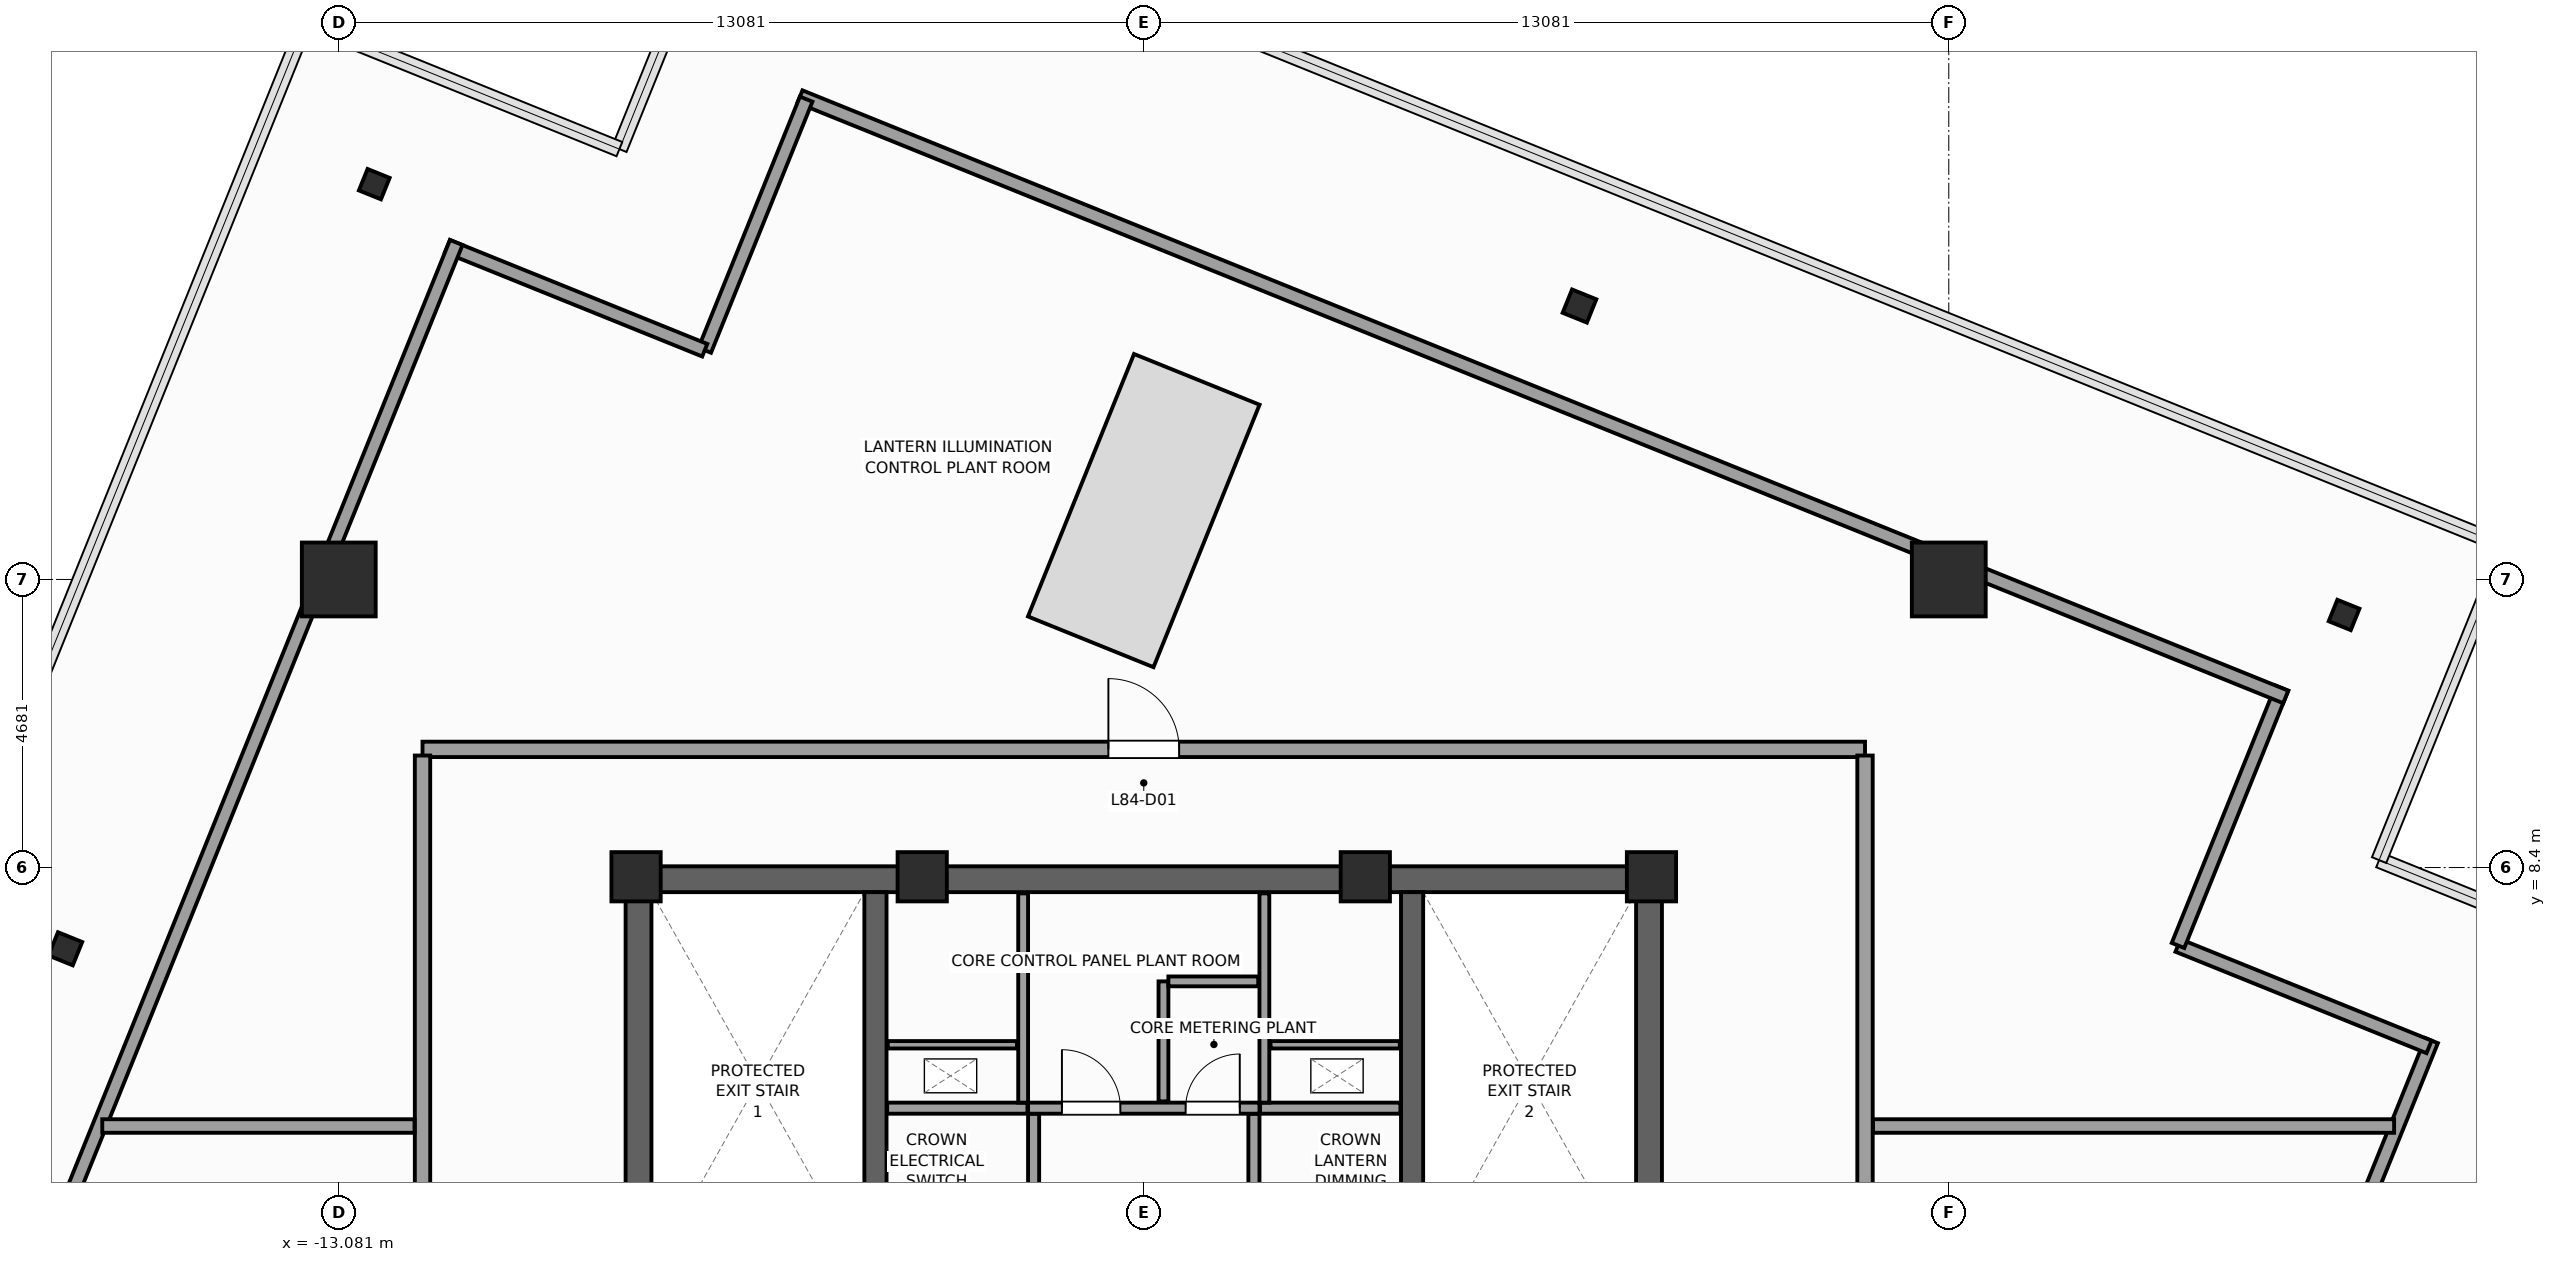
"""IFC4 building model, lengths in metres.
Left out: names, types, materials, properties, quantities, classifications, styles, units other than length and angle.
Written with IfcOpenShell. Run it as: python <this file> out.ifc"""

import sys

from ifc_helpers import new_model, si_unit, direction, frame, frame_2d, origin, origin_2d, place, context, subcontext, project, spatial, rectangle, i_section, extrude, source, transform, mapped, element, fill, save


model = new_model("IFC4")
c1 = context("Model", 3, precision=1e-05, world=origin(), true_north=direction((0.0, 1.0)))
c2 = subcontext(c1, "Body", "Model", "MODEL_VIEW")
j1 = project(units=[si_unit("LENGTHUNIT", "METRE"), si_unit("PLANEANGLEUNIT", "RADIAN")], contexts=[c1])
p1 = place(None, origin())
s1 = spatial("IfcSite", under=j1, at=p1, CompositionType="ELEMENT")
p2 = place(p1, origin())
s2 = spatial("IfcBuilding", under=s1, at=p2, CompositionType="ELEMENT")
p3 = place(p2, frame((0.0, 0.0, 341.6)))
s3 = spatial("IfcBuildingStorey", under=s2, at=p3, CompositionType="ELEMENT", Elevation=341.6)
p4 = place(p3, frame((-8.42, 8.21, 0.0), z_axis=(0.0, 0.0, 1.0), x_axis=(1.0, 0.0, 0.0)))
e1 = element("IfcWall", 1, at=p4, inside=s3, PredefinedType="SHEAR", context=c2, shape_type="SweptSolid", body=[
    extrude(rectangle(XDim=16.84, YDim=0.42, at=frame_2d((8.42, 0.0))), origin(), (0.0, 0.0, 1.0), 4.0),
])
p5 = place(p3, frame((-8.21, -8.0, 0.0), z_axis=(0.0, 0.0, 1.0), x_axis=(0.0, 1.0, 0.0)))
e2 = element("IfcWall", 2, at=p5, inside=s3, PredefinedType="SHEAR", context=c2, shape_type="SweptSolid", body=[
    extrude(rectangle(XDim=16.0, YDim=0.42, at=frame_2d((8.0, 0.0))), origin(), (0.0, 0.0, 1.0), 4.0),
])
p6 = place(p5, frame((4.69, 0.0, 0.0)))
e3 = element("IfcOpeningElement", 3, at=p6, cuts=e2, PredefinedType="OPENING", context=c2, shape_type="SweptSolid", body=[
    extrude(rectangle(XDim=1.3, YDim=2.2, at=frame_2d((0.65, 1.1))), frame((0.0, 0.22, 0.0), z_axis=(0.0, -1.0, 0.0), x_axis=(1.0, 0.0, 0.0)), (0.0, 0.0, 1.0), 0.44),
])
p7 = place(p3, frame((8.21, -8.0, 0.0), z_axis=(0.0, 0.0, 1.0), x_axis=(0.0, 1.0, 0.0)))
e4 = element("IfcWall", 4, at=p7, inside=s3, PredefinedType="SHEAR", context=c2, shape_type="SweptSolid", body=[
    extrude(rectangle(XDim=16.0, YDim=0.42, at=frame_2d((8.0, 0.0))), origin(), (0.0, 0.0, 1.0), 4.0),
])
p8 = place(p7, frame((4.69, 0.0, 0.0)))
e5 = element("IfcOpeningElement", 5, at=p8, cuts=e4, PredefinedType="OPENING", context=c2, shape_type="SweptSolid", body=[
    extrude(rectangle(XDim=1.3, YDim=2.2, at=frame_2d((0.65, 1.1))), frame((0.0, 0.22, 0.0), z_axis=(0.0, -1.0, 0.0), x_axis=(1.0, 0.0, 0.0)), (0.0, 0.0, 1.0), 0.44),
])
for number, where, z_axis, x_axis in (
    (6, (-4.36, -8.0, 0.0), (0.0, 0.0, 1.0), (0.0, 1.0, 0.0)),
    (7, (4.36, -8.0, 0.0), (0.0, 0.0, 1.0), (0.0, 1.0, 0.0)),
):
    element("IfcWall", number, at=place(p3, frame(where, z_axis=z_axis, x_axis=x_axis)), inside=s3, PredefinedType="SHEAR", context=c2, shape_type="SweptSolid", body=[
        extrude(rectangle(XDim=16.0, YDim=0.36, at=frame_2d((8.0, 0.0))), origin(), (0.0, 0.0, 1.0), 4.0),
    ])
m1 = source(origin(), c2, "Body", "SweptSolid", [
    extrude(rectangle(XDim=0.8, YDim=0.8, at=origin_2d()), origin(), (0.0, 0.0, 1.0), 4.0),
])
for number, where, z_axis, x_axis in (
    (8, (8.25, 8.25, 0.0), (0.0, 0.0, 1.0), (1.0, 0.0, 0.0)),
    (9, (-8.25, 8.25, 0.0), (0.0, 0.0, 1.0), (1.0, 0.0, 0.0)),
    (10, (-3.6, 8.25, 0.0), (0.0, 0.0, 1.0), (1.0, 0.0, 0.0)),
    (11, (3.6, 8.25, 0.0), (0.0, 0.0, 1.0), (1.0, 0.0, 0.0)),
):
    element("IfcColumn", number, at=place(p3, frame(where, z_axis=z_axis, x_axis=x_axis)), inside=s3, PredefinedType="PILASTER", context=c2, shape_type="MappedRepresentation", body=[
        mapped(m1, transform((0.0, 0.0, 0.0), scale=1.0)),
    ])
m2 = source(origin(), c2, "Body", "SweptSolid", [
    extrude(rectangle(XDim=1.2, YDim=1.2, at=origin_2d()), origin(), (0.0, 0.0, 1.0), 4.0),
])
for number, where, z_axis, x_axis in (
    (12, (13.081, 13.081, 0.0), (0.0, 0.0, 1.0), (1.0, 0.0, 0.0)),
    (13, (-13.081, 13.081, 0.0), (0.0, 0.0, 1.0), (1.0, 0.0, 0.0)),
):
    element("IfcColumn", number, at=place(p3, frame(where, z_axis=z_axis, x_axis=x_axis)), inside=s3, PredefinedType="COLUMN", context=c2, shape_type="MappedRepresentation", body=[
        mapped(m2, transform((0.0, 0.0, 0.0), scale=1.0)),
    ])
m3 = source(origin(), c2, "Body", "SweptSolid", [
    extrude(i_section(OverallWidth=0.376, OverallDepth=0.387, WebThickness=0.02, FlangeThickness=0.032, FilletRadius=0.015, at=origin_2d()), origin(), (0.0, 0.0, 1.0), 4.0),
])
p9 = place(p3, frame((19.504, 12.504, 0.0), z_axis=(0.0, 0.0, 1.0), x_axis=(0.374606593416, 0.927183854567, 0.0)))
e14 = element("IfcColumn", 14, at=p9, inside=s3, PredefinedType="COLUMN", context=c2, shape_type="MappedRepresentation", body=[
    mapped(m3, transform((0.0, 0.0, 0.0), scale=1.0)),
])
m4 = source(origin(), c2, "Body", "SweptSolid", [
    extrude(i_section(OverallWidth=0.409, OverallDepth=0.425, WebThickness=0.024, FlangeThickness=0.039, FilletRadius=0.015, at=origin_2d()), origin(), (0.0, 0.0, 1.0), 4.0),
])
p10 = place(p3, frame((7.08, 17.524, 0.0), z_axis=(0.0, 0.0, 1.0), x_axis=(0.374606593416, 0.927183854567, 0.0)))
e15 = element("IfcColumn", 15, at=p10, inside=s3, PredefinedType="COLUMN", context=c2, shape_type="MappedRepresentation", body=[
    mapped(m4, transform((0.0, 0.0, 0.0), scale=1.0)),
])
p11 = place(p3, frame((-12.504, 19.504, 0.0), z_axis=(0.0, 0.0, 1.0), x_axis=(0.374606593416, 0.927183854567, 0.0)))
e16 = element("IfcColumn", 16, at=p11, inside=s3, PredefinedType="COLUMN", context=c2, shape_type="MappedRepresentation", body=[
    mapped(m3, transform((0.0, 0.0, 0.0), scale=1.0)),
])
p12 = place(p3, frame((-17.524, 7.08, 0.0), z_axis=(0.0, 0.0, 1.0), x_axis=(0.374606593416, 0.927183854567, 0.0)))
e17 = element("IfcColumn", 17, at=p12, inside=s3, PredefinedType="COLUMN", context=c2, shape_type="MappedRepresentation", body=[
    mapped(m4, transform((0.0, 0.0, 0.0), scale=1.0)),
])
p13 = place(p3, frame((-1.79, -7.98, 0.0), z_axis=(0.0, 0.0, 1.0), x_axis=(0.0, 1.0, 0.0)))
e18 = element("IfcWall", 18, at=p13, inside=s3, PredefinedType="PARTITIONING", context=c2, shape_type="SweptSolid", body=[
    extrude(rectangle(XDim=12.38, YDim=0.18, at=frame_2d((6.19, 0.0))), origin(), (0.0, 0.0, 1.0), 3.65),
])
p14 = place(p13, frame((3.5, 0.0, 0.0)))
e19 = element("IfcOpeningElement", 19, at=p14, cuts=e18, PredefinedType="OPENING", context=c2, shape_type="SweptSolid", body=[
    extrude(rectangle(XDim=1.15, YDim=2.25, at=frame_2d((0.575, 1.125))), frame((0.0, 0.1, 0.0), z_axis=(0.0, -1.0, 0.0), x_axis=(1.0, 0.0, 0.0)), (0.0, 0.0, 1.0), 0.2),
])
p15 = place(p13, frame((9.8, 0.0, 0.0)))
e20 = element("IfcOpeningElement", 20, at=p15, cuts=e18, PredefinedType="OPENING", context=c2, shape_type="SweptSolid", body=[
    extrude(rectangle(XDim=1.15, YDim=2.25, at=frame_2d((0.575, 1.125))), frame((0.0, 0.1, 0.0), z_axis=(0.0, -1.0, 0.0), x_axis=(1.0, 0.0, 0.0)), (0.0, 0.0, 1.0), 0.2),
])
p16 = place(p3, frame((1.79, -7.98, 0.0), z_axis=(0.0, 0.0, 1.0), x_axis=(0.0, 1.0, 0.0)))
e21 = element("IfcWall", 21, at=p16, inside=s3, PredefinedType="PARTITIONING", context=c2, shape_type="SweptSolid", body=[
    extrude(rectangle(XDim=12.38, YDim=0.18, at=frame_2d((6.19, 0.0))), origin(), (0.0, 0.0, 1.0), 3.65),
])
p17 = place(p16, frame((3.5, 0.0, 0.0)))
e22 = element("IfcOpeningElement", 22, at=p17, cuts=e21, PredefinedType="OPENING", context=c2, shape_type="SweptSolid", body=[
    extrude(rectangle(XDim=1.15, YDim=2.25, at=frame_2d((0.575, 1.125))), frame((0.0, 0.1, 0.0), z_axis=(0.0, -1.0, 0.0), x_axis=(1.0, 0.0, 0.0)), (0.0, 0.0, 1.0), 0.2),
])
p18 = place(p16, frame((9.8, 0.0, 0.0)))
e23 = element("IfcOpeningElement", 23, at=p18, cuts=e21, PredefinedType="OPENING", context=c2, shape_type="SweptSolid", body=[
    extrude(rectangle(XDim=1.15, YDim=2.25, at=frame_2d((0.575, 1.125))), frame((0.0, 0.1, 0.0), z_axis=(0.0, -1.0, 0.0), x_axis=(1.0, 0.0, 0.0)), (0.0, 0.0, 1.0), 0.2),
])
p19 = place(p3, frame((-1.88, 4.49, 0.0), z_axis=(0.0, 0.0, 1.0), x_axis=(1.0, 0.0, 0.0)))
e24 = element("IfcWall", 24, at=p19, inside=s3, PredefinedType="PARTITIONING", context=c2, shape_type="SweptSolid", body=[
    extrude(rectangle(XDim=3.76, YDim=0.18, at=frame_2d((1.88, 0.0))), origin(), (0.0, 0.0, 1.0), 3.65),
])
p20 = place(p19, frame((0.55, 0.0, 0.0)))
e25 = element("IfcOpeningElement", 25, at=p20, cuts=e24, PredefinedType="OPENING", context=c2, shape_type="SweptSolid", body=[
    extrude(rectangle(XDim=0.95, YDim=2.1, at=frame_2d((0.475, 1.05))), frame((0.0, 0.1, 0.0), z_axis=(0.0, -1.0, 0.0), x_axis=(1.0, 0.0, 0.0)), (0.0, 0.0, 1.0), 0.2),
])
p21 = place(p19, frame((2.56, 0.0, 0.0)))
e26 = element("IfcOpeningElement", 26, at=p21, cuts=e24, PredefinedType="OPENING", context=c2, shape_type="SweptSolid", body=[
    extrude(rectangle(XDim=0.88, YDim=2.1, at=frame_2d((0.44, 1.05))), frame((0.0, 0.1, 0.0), z_axis=(0.0, -1.0, 0.0), x_axis=(1.0, 0.0, 0.0)), (0.0, 0.0, 1.0), 0.2),
])
for number, where, z_axis, x_axis in (
    (27, (-4.17, 4.49, 0.0), (0.0, 0.0, 1.0), (1.0, 0.0, 0.0)),
    (28, (1.89, 4.49, 0.0), (0.0, 0.0, 1.0), (1.0, 0.0, 0.0)),
):
    element("IfcWall", number, at=place(p3, frame(where, z_axis=z_axis, x_axis=x_axis)), inside=s3, PredefinedType="PARTITIONING", context=c2, shape_type="SweptSolid", body=[
        extrude(rectangle(XDim=2.28, YDim=0.18, at=frame_2d((1.14, 0.0))), origin(), (0.0, 0.0, 1.0), 3.65),
    ])
for number, where, z_axis, x_axis in (
    (29, (-1.96, 4.58, 0.0), (0.0, 0.0, 1.0), (0.0, 1.0, 0.0)),
    (30, (1.96, 4.58, 0.0), (0.0, 0.0, 1.0), (0.0, 1.0, 0.0)),
):
    element("IfcWall", number, at=place(p3, frame(where, z_axis=z_axis, x_axis=x_axis)), inside=s3, PredefinedType="PARTITIONING", context=c2, shape_type="SweptSolid", body=[
        extrude(rectangle(XDim=3.4, YDim=0.16, at=frame_2d((1.7, 0.0))), origin(), (0.0, 0.0, 1.0), 3.65),
    ])
for number, where, z_axis, x_axis in (
    (31, (-4.16, 5.52, 0.0), (0.0, 0.0, 1.0), (1.0, 0.0, 0.0)),
    (32, (2.06, 5.52, 0.0), (0.0, 0.0, 1.0), (1.0, 0.0, 0.0)),
):
    element("IfcWall", number, at=place(p3, frame(where, z_axis=z_axis, x_axis=x_axis)), inside=s3, PredefinedType="PARTITIONING", context=c2, shape_type="SweptSolid", body=[
        extrude(rectangle(XDim=2.1, YDim=0.12, at=frame_2d((1.05, 0.0))), origin(), (0.0, 0.0, 1.0), 3.65),
    ])
p22 = place(p3, frame((0.32, 4.6, 0.0), z_axis=(0.0, 0.0, 1.0), x_axis=(0.0, 1.0, 0.0)))
e33 = element("IfcWall", 33, at=p22, inside=s3, PredefinedType="PARTITIONING", context=c2, shape_type="SweptSolid", body=[
    extrude(rectangle(XDim=1.95, YDim=0.16, at=frame_2d((0.975, 0.0))), origin(), (0.0, 0.0, 1.0), 3.65),
])
p23 = place(p3, frame((0.4, 6.55, 0.0), z_axis=(0.0, 0.0, 1.0), x_axis=(1.0, 0.0, 0.0)))
e34 = element("IfcWall", 34, at=p23, inside=s3, PredefinedType="PARTITIONING", context=c2, shape_type="SweptSolid", body=[
    extrude(rectangle(XDim=1.46, YDim=0.16, at=frame_2d((0.73, 0.0))), origin(), (0.0, 0.0, 1.0), 3.65),
])
p24 = place(p3, frame((11.172, -18.556, 0.0), z_axis=(0.0, 0.0, 1.0), x_axis=(0.374611707018, 0.927181788521, 0.0)))
e35 = element("IfcWall", 35, at=p24, inside=s3, PredefinedType="PARTITIONING", context=c2, shape_type="SweptSolid", body=[
    extrude(rectangle(XDim=26.04, YDim=0.22, at=frame_2d((13.02, 0.0))), origin(), (0.0, 0.0, 1.0), 3.0),
])
p25 = place(p3, frame((20.886, 5.486, 0.0), z_axis=(0.0, 0.0, 1.0), x_axis=(-0.927189216671, 0.374593321469, 0.0)))
e36 = element("IfcWall", 36, at=p25, inside=s3, PredefinedType="PARTITIONING", context=c2, shape_type="SweptSolid", body=[
    extrude(rectangle(XDim=4.4, YDim=0.22, at=frame_2d((2.2, 0.0))), origin(), (0.0, 0.0, 1.0), 3.65),
])
p26 = place(p3, frame((16.806, 7.134, 0.0), z_axis=(0.0, 0.0, 1.0), x_axis=(0.374599091925, 0.927186885331, 0.0)))
e37 = element("IfcWall", 37, at=p26, inside=s3, PredefinedType="PARTITIONING", context=c2, shape_type="SweptSolid", body=[
    extrude(rectangle(XDim=4.51, YDim=0.22, at=frame_2d((2.255, 0.0))), origin(), (0.0, 0.0, 1.0), 3.65),
])
p27 = place(p3, frame((18.556, 11.172, 0.0), z_axis=(0.0, 0.0, 1.0), x_axis=(-0.927181788521, 0.374611707018, 0.0)))
e38 = element("IfcWall", 38, at=p27, inside=s3, PredefinedType="PARTITIONING", context=c2, shape_type="SweptSolid", body=[
    extrude(rectangle(XDim=26.04, YDim=0.22, at=frame_2d((13.02, 0.0))), origin(), (0.0, 0.0, 1.0), 3.0),
])
p28 = place(p3, frame((-5.486, 20.886, 0.0), z_axis=(0.0, 0.0, 1.0), x_axis=(-0.374593321469, -0.927189216671, 0.0)))
e39 = element("IfcWall", 39, at=p28, inside=s3, PredefinedType="PARTITIONING", context=c2, shape_type="SweptSolid", body=[
    extrude(rectangle(XDim=4.4, YDim=0.22, at=frame_2d((2.2, 0.0))), origin(), (0.0, 0.0, 1.0), 3.65),
])
p29 = place(p3, frame((-7.134, 16.806, 0.0), z_axis=(0.0, 0.0, 1.0), x_axis=(-0.927186885331, 0.374599091925, 0.0)))
e40 = element("IfcWall", 40, at=p29, inside=s3, PredefinedType="PARTITIONING", context=c2, shape_type="SweptSolid", body=[
    extrude(rectangle(XDim=4.51, YDim=0.22, at=frame_2d((2.255, 0.0))), origin(), (0.0, 0.0, 1.0), 3.65),
])
p30 = place(p3, frame((-11.172, 18.556, 0.0), z_axis=(0.0, 0.0, 1.0), x_axis=(-0.374611707018, -0.927181788521, 0.0)))
e41 = element("IfcWall", 41, at=p30, inside=s3, PredefinedType="PARTITIONING", context=c2, shape_type="SweptSolid", body=[
    extrude(rectangle(XDim=26.04, YDim=0.22, at=frame_2d((13.02, 0.0))), origin(), (0.0, 0.0, 1.0), 3.0),
])
p31 = place(p3, frame((-11.72, 10.32, 0.0), z_axis=(0.0, 0.0, 1.0), x_axis=(1.0, 0.0, 0.0)))
e42 = element("IfcWall", 42, at=p31, inside=s3, PredefinedType="PARTITIONING", context=c2, shape_type="SweptSolid", body=[
    extrude(rectangle(XDim=23.44, YDim=0.25, at=frame_2d((11.72, 0.0))), origin(), (0.0, 0.0, 1.0), 3.65),
])
p32 = place(p31, frame((11.145, 0.0, 0.0)))
e43 = element("IfcOpeningElement", 43, at=p32, cuts=e42, PredefinedType="OPENING", context=c2, shape_type="SweptSolid", body=[
    extrude(rectangle(XDim=1.15, YDim=2.25, at=frame_2d((0.575, 1.125))), frame((0.0, 0.135, 0.0), z_axis=(0.0, -1.0, 0.0), x_axis=(1.0, 0.0, 0.0)), (0.0, 0.0, 1.0), 0.27),
])
p33 = place(p3, frame((-11.72, -11.62, 0.0), z_axis=(0.0, 0.0, 1.0), x_axis=(0.0, 1.0, 0.0)))
e44 = element("IfcWall", 44, at=p33, inside=s3, PredefinedType="PARTITIONING", context=c2, shape_type="SweptSolid", body=[
    extrude(rectangle(XDim=21.84, YDim=0.25, at=frame_2d((10.92, 0.0))), origin(), (0.0, 0.0, 1.0), 3.65),
])
p34 = place(p33, frame((11.045, 0.0, 0.0)))
e45 = element("IfcOpeningElement", 45, at=p34, cuts=e44, PredefinedType="OPENING", context=c2, shape_type="SweptSolid", body=[
    extrude(rectangle(XDim=1.15, YDim=2.25, at=frame_2d((0.575, 1.125))), frame((0.0, 0.135, 0.0), z_axis=(0.0, -1.0, 0.0), x_axis=(1.0, 0.0, 0.0)), (0.0, 0.0, 1.0), 0.27),
])
p35 = place(p3, frame((11.72, -11.62, 0.0), z_axis=(0.0, 0.0, 1.0), x_axis=(0.0, 1.0, 0.0)))
e46 = element("IfcWall", 46, at=p35, inside=s3, PredefinedType="PARTITIONING", context=c2, shape_type="SweptSolid", body=[
    extrude(rectangle(XDim=21.84, YDim=0.25, at=frame_2d((10.92, 0.0))), origin(), (0.0, 0.0, 1.0), 3.65),
])
p36 = place(p35, frame((11.045, 0.0, 0.0)))
e47 = element("IfcOpeningElement", 47, at=p36, cuts=e46, PredefinedType="OPENING", context=c2, shape_type="SweptSolid", body=[
    extrude(rectangle(XDim=1.15, YDim=2.25, at=frame_2d((0.575, 1.125))), frame((0.0, 0.135, 0.0), z_axis=(0.0, -1.0, 0.0), x_axis=(1.0, 0.0, 0.0)), (0.0, 0.0, 1.0), 0.27),
])
p37 = place(p3, frame((11.85, 4.2, 0.0), z_axis=(0.0, 0.0, 1.0), x_axis=(1.0, 0.0, 0.0)))
e48 = element("IfcWall", 48, at=p37, inside=s3, PredefinedType="PARTITIONING", context=c2, shape_type="SweptSolid", body=[
    extrude(rectangle(XDim=8.468, YDim=0.22, at=frame_2d((4.234, 0.0))), origin(), (0.0, 0.0, 1.0), 3.65),
])
p38 = place(p3, frame((-11.85, 4.2, 0.0), z_axis=(0.0, 0.0, 1.0), x_axis=(-1.0, 0.0, 0.0)))
e49 = element("IfcWall", 49, at=p38, inside=s3, PredefinedType="PARTITIONING", context=c2, shape_type="SweptSolid", body=[
    extrude(rectangle(XDim=5.074, YDim=0.22, at=frame_2d((2.537, 0.0))), origin(), (0.0, 0.0, 1.0), 3.65),
])
m5 = source(origin(), c2, "Body", "SweptSolid", [
    extrude(rectangle(XDim=0.95, YDim=2.1, at=frame_2d((0.475, 1.05))), frame((0.0, 0.025, 0.0), z_axis=(0.0, -1.0, 0.0), x_axis=(1.0, 0.0, 0.0)), (0.0, 0.0, 1.0), 0.05),
])
p39 = place(p20, origin())
e50 = element("IfcDoor", 50, at=p39, inside=s3, OperationType="SINGLE_SWING_LEFT", PredefinedType="DOOR", context=c2, shape_type="MappedRepresentation", body=[
    mapped(m5, transform((0.0, 0.0, 0.0), scale=1.0)),
])
fill(e25, e50)
m6 = source(origin(), c2, "Body", "SweptSolid", [
    extrude(rectangle(XDim=0.88, YDim=2.1, at=frame_2d((0.44, 1.05))), frame((0.0, 0.025, 0.0), z_axis=(0.0, -1.0, 0.0), x_axis=(1.0, 0.0, 0.0)), (0.0, 0.0, 1.0), 0.05),
])
p40 = place(p21, origin())
e51 = element("IfcDoor", 51, at=p40, inside=s3, OperationType="SINGLE_SWING_RIGHT", PredefinedType="DOOR", context=c2, shape_type="MappedRepresentation", body=[
    mapped(m6, transform((0.0, 0.0, 0.0), scale=1.0)),
])
fill(e26, e51)
m7 = source(origin(), c2, "Body", "SweptSolid", [
    extrude(rectangle(XDim=1.15, YDim=2.25, at=frame_2d((0.575, 1.125))), frame((0.0, 0.025, 0.0), z_axis=(0.0, -1.0, 0.0), x_axis=(1.0, 0.0, 0.0)), (0.0, 0.0, 1.0), 0.05),
])
p41 = place(p32, origin())
e52 = element("IfcDoor", 52, at=p41, inside=s3, OperationType="SINGLE_SWING_LEFT", PredefinedType="DOOR", context=c2, shape_type="MappedRepresentation", body=[
    mapped(m7, transform((0.0, 0.0, 0.0), scale=1.0)),
])
fill(e43, e52)
save(model, sys.argv[1])
